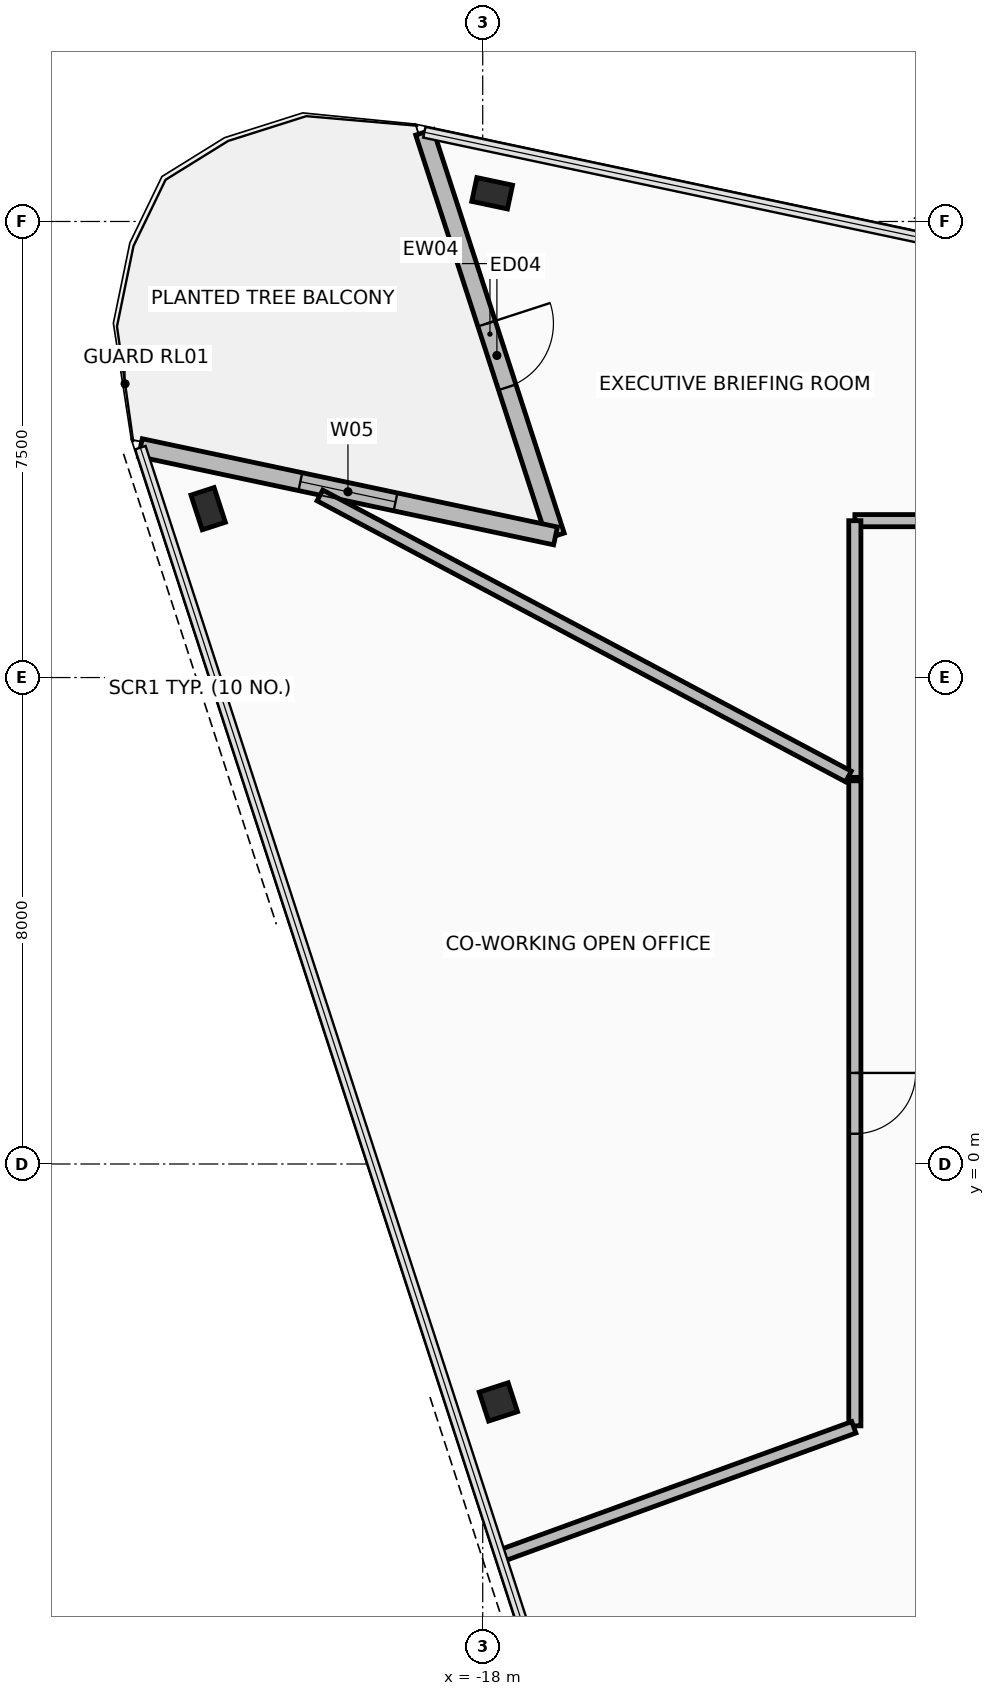
"""IFC4 building model, lengths in metres.
Left out: names, types, materials, properties, quantities, classifications, styles, units other than length and angle.
Written with IfcOpenShell. Run it as: python <this file> out.ifc"""

import sys

from ifc_helpers import new_model, si_unit, direction, frame, frame_2d, origin, origin_2d, place, context, subcontext, project, spatial, rectangle, hollow_rectangle, extrude, element, fill, save


model = new_model("IFC4")
c1 = context("Model", 3, precision=1e-05, world=origin(), true_north=direction((0.0, 1.0)))
c2 = subcontext(c1, "Body", "Model", "MODEL_VIEW")
j1 = project(units=[si_unit("LENGTHUNIT", "METRE"), si_unit("PLANEANGLEUNIT", "RADIAN")], contexts=[c1])
p1 = place(None, origin())
s1 = spatial("IfcSite", under=j1, at=p1, CompositionType="ELEMENT")
p2 = place(p1, origin())
s2 = spatial("IfcBuilding", under=s1, at=p2, CompositionType="ELEMENT")
p3 = place(p2, frame((0.0, 0.0, 196.85)))
s3 = spatial("IfcBuildingStorey", under=s2, at=p3, CompositionType="ELEMENT", Elevation=196.85)
p4 = place(p3, frame((-22.515, 10.777, -0.19), z_axis=(0.0, 0.0, 1.0), x_axis=(-0.309016994375, 0.951056516295, 0.0)))
e1 = element("IfcColumn", 1, at=p4, inside=s3, PredefinedType="COLUMN", context=c2, shape_type="SweptSolid", body=[
    extrude(hollow_rectangle(XDim=0.4, YDim=0.6, WallThickness=0.03, at=origin_2d()), origin(), (0.0, 0.0, 1.0), 3.79),
])
p5 = place(p3, frame((-17.743, -3.913, -0.19), z_axis=(0.0, 0.0, 1.0), x_axis=(-0.309016994375, 0.951056516295, 0.0)))
e2 = element("IfcColumn", 2, at=p5, inside=s3, PredefinedType="COLUMN", context=c2, shape_type="SweptSolid", body=[
    extrude(hollow_rectangle(XDim=0.5, YDim=0.5, WallThickness=0.032, at=origin_2d()), origin(), (0.0, 0.0, 1.0), 3.79),
])
p6 = place(p3, frame((-17.845, 15.964, 0.0), z_axis=(0.0, 0.0, 1.0), x_axis=(-0.978147600734, 0.207911690818, 0.0)))
e3 = element("IfcColumn", 3, at=p6, inside=s3, PredefinedType="COLUMN", context=c2, shape_type="SweptSolid", body=[
    extrude(hollow_rectangle(XDim=0.4, YDim=0.6, WallThickness=0.03, at=origin_2d()), origin(), (0.0, 0.0, 1.0), 3.6),
])
p7 = place(p3, frame((-18.96, 16.968, 0.0), z_axis=(0.0, 0.0, 1.0), x_axis=(0.309030708092, -0.951052060329, 0.0)))
e4 = element("IfcWall", 4, at=p7, inside=s3, PredefinedType="STANDARD", context=c2, shape_type="SweptSolid", body=[
    extrude(rectangle(XDim=6.98, YDim=0.3, at=frame_2d((3.49, 0.0))), origin(), (0.0, 0.0, 1.0), 2.715),
])
p8 = place(p7, frame((3.31, 0.0, 0.0)))
e5 = element("IfcOpeningElement", 5, at=p8, cuts=e4, PredefinedType="OPENING", context=c2, shape_type="SweptSolid", body=[
    extrude(rectangle(XDim=1.1, YDim=2.2, at=frame_2d((0.55, 1.1))), frame((0.0, 0.16, 0.0), z_axis=(0.0, -1.0, 0.0), x_axis=(1.0, 0.0, 0.0)), (0.0, 0.0, 1.0), 0.32),
])
p9 = place(p3, frame((-16.803, 10.329, 0.0), z_axis=(0.0, 0.0, 1.0), x_axis=(-0.9781486268, 0.207906863497, 0.0)))
e6 = element("IfcWall", 6, at=p9, inside=s3, PredefinedType="STANDARD", context=c2, shape_type="SweptSolid", body=[
    extrude(rectangle(XDim=6.98, YDim=0.3, at=frame_2d((3.49, 0.0))), origin(), (0.0, 0.0, 1.0), 2.715),
])
p10 = place(p9, frame((2.69, 0.0, 0.335)))
e7 = element("IfcOpeningElement", 7, at=p10, cuts=e6, PredefinedType="OPENING", context=c2, shape_type="SweptSolid", body=[
    extrude(rectangle(XDim=1.6, YDim=2.2, at=frame_2d((0.8, 1.1))), frame((0.0, 0.16, 0.0), z_axis=(0.0, -1.0, 0.0), x_axis=(1.0, 0.0, 0.0)), (0.0, 0.0, 1.0), 0.32),
])
p11 = place(p3, frame((-2.746, 10.58, 0.0), z_axis=(0.0, 0.0, 1.0), x_axis=(-1.0, 0.0, 0.0)))
e8 = element("IfcWall", 8, at=p11, inside=s3, PredefinedType="PARTITIONING", context=c2, shape_type="SweptSolid", body=[
    extrude(rectangle(XDim=9.133, YDim=0.2, at=frame_2d((4.567, 0.0))), origin(), (0.0, 0.0, 1.0), 2.865),
])
p12 = place(p11, frame((3.967, 0.0, 0.0)))
e9 = element("IfcOpeningElement", 9, at=p12, cuts=e8, PredefinedType="OPENING", context=c2, shape_type="SweptSolid", body=[
    extrude(rectangle(XDim=1.2, YDim=2.15, at=frame_2d((0.6, 1.075))), frame((0.0, 0.11, 0.0), z_axis=(0.0, -1.0, 0.0), x_axis=(1.0, 0.0, 0.0)), (0.0, 0.0, 1.0), 0.22),
])
p13 = place(p3, frame((-11.88, 10.579, 0.0), z_axis=(0.0, 0.0, 1.0), x_axis=(0.0, -1.0, 0.0)))
e10 = element("IfcWall", 10, at=p13, inside=s3, PredefinedType="PARTITIONING", context=c2, shape_type="SweptSolid", body=[
    extrude(rectangle(XDim=4.221, YDim=0.2, at=frame_2d((2.11, 0.0))), origin(), (0.0, 0.0, 1.0), 2.765),
])
p14 = place(p3, frame((-11.985, 6.373, 0.0), z_axis=(0.0, 0.0, 1.0), x_axis=(-0.882952879682, 0.469461619583, 0.0)))
e11 = element("IfcWall", 11, at=p14, inside=s3, PredefinedType="PARTITIONING", context=c2, shape_type="SweptSolid", body=[
    extrude(rectangle(XDim=9.845, YDim=0.2, at=frame_2d((4.922, 0.0))), origin(), (0.0, 0.0, 1.0), 2.865),
])
p15 = place(p3, frame((-11.88, 6.302, 0.0), z_axis=(0.0, 0.0, 1.0), x_axis=(0.0, -1.0, 0.0)))
e12 = element("IfcWall", 12, at=p15, inside=s3, PredefinedType="PARTITIONING", context=c2, shape_type="SweptSolid", body=[
    extrude(rectangle(XDim=10.608, YDim=0.2, at=frame_2d((5.304, 0.0))), origin(), (0.0, 0.0, 1.0), 3.42),
])
p16 = place(p15, frame((4.804, 0.0, 0.0)))
e13 = element("IfcOpeningElement", 13, at=p16, cuts=e12, PredefinedType="OPENING", context=c2, shape_type="SweptSolid", body=[
    extrude(rectangle(XDim=1.0, YDim=2.15, at=frame_2d((0.5, 1.075))), frame((0.0, 0.11, 0.0), z_axis=(0.0, -1.0, 0.0), x_axis=(1.0, 0.0, 0.0)), (0.0, 0.0, 1.0), 0.22),
])
p17 = place(p3, frame((-11.896, -4.33, 0.0), z_axis=(0.0, 0.0, 1.0), x_axis=(-0.939708906317, -0.341975395883, 0.0)))
e14 = element("IfcWall", 14, at=p17, inside=s3, PredefinedType="PARTITIONING", context=c2, shape_type="SweptSolid", body=[
    extrude(rectangle(XDim=6.159, YDim=0.2, at=frame_2d((3.08, 0.0))), origin(), (0.0, 0.0, 1.0), 2.715),
])
p18 = place(p8, origin())
e15 = element("IfcDoor", 15, at=p18, inside=s3, OperationType="SINGLE_SWING_LEFT", PredefinedType="DOOR", context=c2, shape_type="SweptSolid", body=[
    extrude(rectangle(XDim=1.1, YDim=2.2, at=frame_2d((0.55, 1.1))), frame((0.0, 0.025, 0.0), z_axis=(0.0, -1.0, 0.0), x_axis=(1.0, 0.0, 0.0)), (0.0, 0.0, 1.0), 0.05),
])
fill(e5, e15)
p19 = place(p10, origin())
e16 = element("IfcWindow", 16, at=p19, inside=s3, PartitioningType="SINGLE_PANEL", PredefinedType="WINDOW", context=c2, shape_type="SweptSolid", body=[
    extrude(rectangle(XDim=1.6, YDim=2.2, at=frame_2d((0.8, 1.1))), frame((0.0, 0.03, 0.0), z_axis=(0.0, -1.0, 0.0), x_axis=(1.0, 0.0, 0.0)), (0.0, 0.0, 1.0), 0.06),
])
fill(e7, e16)
p20 = place(p16, origin())
e17 = element("IfcDoor", 17, at=p20, inside=s3, OperationType="SINGLE_SWING_RIGHT", PredefinedType="DOOR", context=c2, shape_type="SweptSolid", body=[
    extrude(rectangle(XDim=1.0, YDim=2.15, at=frame_2d((0.5, 1.075))), frame((0.0, 0.025, 0.0), z_axis=(0.0, -1.0, 0.0), x_axis=(1.0, 0.0, 0.0)), (0.0, 0.0, 1.0), 0.05),
])
fill(e13, e17)
save(model, sys.argv[1])
